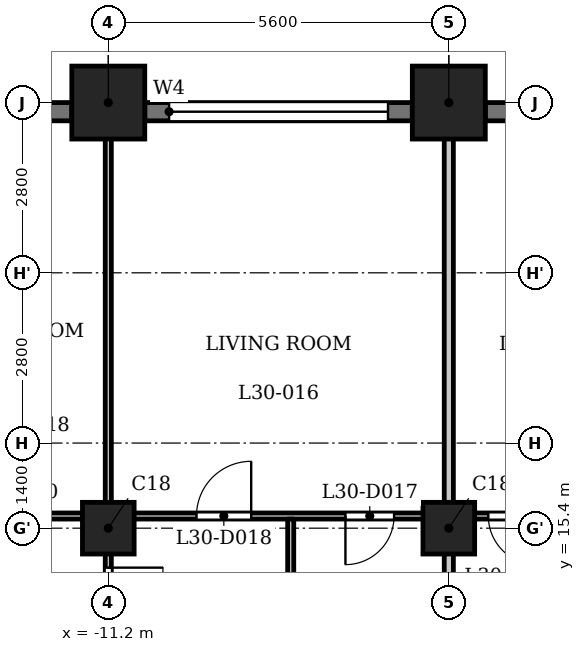
"""IFC4 building model, lengths in metres.
Left out: names, types, materials, properties, quantities, classifications, styles, units other than length and angle.
Written with IfcOpenShell. Run it as: python <this file> out.ifc"""

import sys

from ifc_helpers import new_model, si_unit, direction, frame, frame_2d, origin, origin_2d, place, context, subcontext, project, spatial, rectangle, extrude, element, fill, save


model = new_model("IFC4")
c1 = context("Model", 3, precision=1e-05, world=origin(), true_north=direction((0.0, 1.0)))
c2 = subcontext(c1, "Body", "Model", "MODEL_VIEW")
j1 = project(units=[si_unit("LENGTHUNIT", "METRE"), si_unit("PLANEANGLEUNIT", "RADIAN")], contexts=[c1])
p1 = place(None, origin())
s1 = spatial("IfcSite", under=j1, at=p1, CompositionType="ELEMENT")
p2 = place(p1, origin())
s2 = spatial("IfcBuilding", under=s1, at=p2, CompositionType="ELEMENT")
p3 = place(p2, frame((0.0, 0.0, 118.3)))
s3 = spatial("IfcBuildingStorey", under=s2, at=p3, CompositionType="ELEMENT", Elevation=118.3)
for number, where, z_axis, x_axis in (
    (1, (-5.6, 22.4, 0.0), (0.0, 0.0, 1.0), (1.0, 0.0, 0.0)),
    (2, (-11.2, 22.4, 0.0), (0.0, 0.0, 1.0), (1.0, 0.0, 0.0)),
):
    element("IfcColumn", number, at=place(p3, frame(where, z_axis=z_axis, x_axis=x_axis)), inside=s3, PredefinedType="COLUMN", context=c2, shape_type="SweptSolid", body=[
        extrude(rectangle(XDim=1.2, YDim=1.2, at=origin_2d()), origin(), (0.0, 0.0, 1.0), 3.5),
    ])
for number, where, z_axis, x_axis in (
    (3, (-11.2, 15.4, 0.0), (0.0, 0.0, 1.0), (1.0, 0.0, 0.0)),
    (4, (-5.6, 15.4, 0.0), (0.0, 0.0, 1.0), (1.0, 0.0, 0.0)),
):
    element("IfcColumn", number, at=place(p3, frame(where, z_axis=z_axis, x_axis=x_axis)), inside=s3, PredefinedType="COLUMN", context=c2, shape_type="SweptSolid", body=[
        extrude(rectangle(XDim=0.85, YDim=0.85, at=origin_2d()), origin(), (0.0, 0.0, 1.0), 3.5),
    ])
p4 = place(p3, frame((-0.6, 22.25, 0.0), z_axis=(0.0, 0.0, 1.0), x_axis=(-1.0, 0.0, 0.0)))
e5 = element("IfcWall", 5, at=p4, inside=s3, PredefinedType="SOLIDWALL", context=c2, shape_type="SweptSolid", body=[
    extrude(rectangle(XDim=4.4, YDim=0.3, at=frame_2d((2.2, 0.0))), origin(), (0.0, 0.0, 1.0), 2.4),
])
p5 = place(p4, frame((0.4, 0.0, 1.2)))
e6 = element("IfcOpeningElement", 6, at=p5, cuts=e5, PredefinedType="OPENING", context=c2, shape_type="SweptSolid", body=[
    extrude(rectangle(XDim=3.6, YDim=0.95, at=frame_2d((1.8, 0.475))), frame((0.0, 0.16, 0.0), z_axis=(0.0, -1.0, 0.0), x_axis=(1.0, 0.0, 0.0)), (0.0, 0.0, 1.0), 0.32),
])
p6 = place(p3, frame((-6.2, 22.25, 0.0), z_axis=(0.0, 0.0, 1.0), x_axis=(-1.0, 0.0, 0.0)))
e7 = element("IfcWall", 7, at=p6, inside=s3, PredefinedType="SOLIDWALL", context=c2, shape_type="SweptSolid", body=[
    extrude(rectangle(XDim=4.4, YDim=0.3, at=frame_2d((2.2, 0.0))), origin(), (0.0, 0.0, 1.0), 2.4),
])
p7 = place(p6, frame((0.4, 0.0, 1.2)))
e8 = element("IfcOpeningElement", 8, at=p7, cuts=e7, PredefinedType="OPENING", context=c2, shape_type="SweptSolid", body=[
    extrude(rectangle(XDim=3.6, YDim=0.95, at=frame_2d((1.8, 0.475))), frame((0.0, 0.16, 0.0), z_axis=(0.0, -1.0, 0.0), x_axis=(1.0, 0.0, 0.0)), (0.0, 0.0, 1.0), 0.32),
])
p8 = place(p3, frame((-11.8, 22.25, 0.0), z_axis=(0.0, 0.0, 1.0), x_axis=(-1.0, 0.0, 0.0)))
e9 = element("IfcWall", 9, at=p8, inside=s3, PredefinedType="SOLIDWALL", context=c2, shape_type="SweptSolid", body=[
    extrude(rectangle(XDim=4.4, YDim=0.3, at=frame_2d((2.2, 0.0))), origin(), (0.0, 0.0, 1.0), 2.4),
])
p9 = place(p8, frame((0.363, 0.0, 0.6)))
e10 = element("IfcOpeningElement", 10, at=p9, cuts=e9, PredefinedType="OPENING", context=c2, shape_type="SweptSolid", body=[
    extrude(rectangle(XDim=1.2, YDim=1.55, at=frame_2d((0.6, 0.775))), frame((0.0, 0.16, 0.0), z_axis=(0.0, -1.0, 0.0), x_axis=(1.0, 0.0, 0.0)), (0.0, 0.0, 1.0), 0.32),
])
p10 = place(p8, frame((2.337, 0.0, 0.9)))
e11 = element("IfcOpeningElement", 11, at=p10, cuts=e9, PredefinedType="OPENING", context=c2, shape_type="SweptSolid", body=[
    extrude(rectangle(XDim=1.8, YDim=1.25, at=frame_2d((0.9, 0.625))), frame((0.0, 0.16, 0.0), z_axis=(0.0, -1.0, 0.0), x_axis=(1.0, 0.0, 0.0)), (0.0, 0.0, 1.0), 0.32),
])
p11 = place(p3, frame((-16.725, 15.6, 0.0), z_axis=(0.0, 0.0, 1.0), x_axis=(1.0, 0.0, 0.0)))
e12 = element("IfcWall", 12, at=p11, inside=s3, PredefinedType="PARTITIONING", context=c2, shape_type="SweptSolid", body=[
    extrude(rectangle(XDim=33.45, YDim=0.1, at=frame_2d((16.725, 0.0))), origin(), (0.0, 0.0, 1.0), 3.2),
])
p12 = place(p11, frame((9.425, 0.0, 0.0)))
e13 = element("IfcOpeningElement", 13, at=p12, cuts=e12, PredefinedType="OPENING", context=c2, shape_type="SweptSolid", body=[
    extrude(rectangle(XDim=0.8, YDim=2.1, at=frame_2d((0.4, 1.05))), frame((0.0, 0.06, 0.0), z_axis=(0.0, -1.0, 0.0), x_axis=(1.0, 0.0, 0.0)), (0.0, 0.0, 1.0), 0.12),
])
p13 = place(p11, frame((6.975, 0.0, 0.0)))
e14 = element("IfcOpeningElement", 14, at=p13, cuts=e12, PredefinedType="OPENING", context=c2, shape_type="SweptSolid", body=[
    extrude(rectangle(XDim=0.9, YDim=2.1, at=frame_2d((0.45, 1.05))), frame((0.0, 0.06, 0.0), z_axis=(0.0, -1.0, 0.0), x_axis=(1.0, 0.0, 0.0)), (0.0, 0.0, 1.0), 0.12),
])
p14 = place(p11, frame((1.875, 0.0, 0.0)))
e15 = element("IfcOpeningElement", 15, at=p14, cuts=e12, PredefinedType="OPENING", context=c2, shape_type="SweptSolid", body=[
    extrude(rectangle(XDim=0.9, YDim=2.1, at=frame_2d((0.45, 1.05))), frame((0.0, 0.06, 0.0), z_axis=(0.0, -1.0, 0.0), x_axis=(1.0, 0.0, 0.0)), (0.0, 0.0, 1.0), 0.12),
])
p15 = place(p11, frame((3.475, 0.0, 0.0)))
e16 = element("IfcOpeningElement", 16, at=p15, cuts=e12, PredefinedType="OPENING", context=c2, shape_type="SweptSolid", body=[
    extrude(rectangle(XDim=0.9, YDim=2.1, at=frame_2d((0.45, 1.05))), frame((0.0, 0.06, 0.0), z_axis=(0.0, -1.0, 0.0), x_axis=(1.0, 0.0, 0.0)), (0.0, 0.0, 1.0), 0.12),
])
p16 = place(p11, frame((11.775, 0.0, 0.0)))
e17 = element("IfcOpeningElement", 17, at=p16, cuts=e12, PredefinedType="OPENING", context=c2, shape_type="SweptSolid", body=[
    extrude(rectangle(XDim=0.8, YDim=2.1, at=frame_2d((0.4, 1.05))), frame((0.0, 0.06, 0.0), z_axis=(0.0, -1.0, 0.0), x_axis=(1.0, 0.0, 0.0)), (0.0, 0.0, 1.0), 0.12),
])
p17 = place(p11, frame((14.175, 0.0, 0.0)))
e18 = element("IfcOpeningElement", 18, at=p17, cuts=e12, PredefinedType="OPENING", context=c2, shape_type="SweptSolid", body=[
    extrude(rectangle(XDim=0.9, YDim=2.1, at=frame_2d((0.45, 1.05))), frame((0.0, 0.06, 0.0), z_axis=(0.0, -1.0, 0.0), x_axis=(1.0, 0.0, 0.0)), (0.0, 0.0, 1.0), 0.12),
])
p18 = place(p11, frame((20.725, 0.0, 0.0)))
e19 = element("IfcOpeningElement", 19, at=p18, cuts=e12, PredefinedType="OPENING", context=c2, shape_type="SweptSolid", body=[
    extrude(rectangle(XDim=0.8, YDim=2.1, at=frame_2d((0.4, 1.05))), frame((0.0, 0.06, 0.0), z_axis=(0.0, -1.0, 0.0), x_axis=(1.0, 0.0, 0.0)), (0.0, 0.0, 1.0), 0.12),
])
p19 = place(p11, frame((18.375, 0.0, 0.0)))
e20 = element("IfcOpeningElement", 20, at=p19, cuts=e12, PredefinedType="OPENING", context=c2, shape_type="SweptSolid", body=[
    extrude(rectangle(XDim=0.9, YDim=2.1, at=frame_2d((0.45, 1.05))), frame((0.0, 0.06, 0.0), z_axis=(0.0, -1.0, 0.0), x_axis=(1.0, 0.0, 0.0)), (0.0, 0.0, 1.0), 0.12),
])
p20 = place(p11, frame((26.425, 0.0, 0.0)))
e21 = element("IfcOpeningElement", 21, at=p20, cuts=e12, PredefinedType="OPENING", context=c2, shape_type="SweptSolid", body=[
    extrude(rectangle(XDim=0.8, YDim=2.1, at=frame_2d((0.4, 1.05))), frame((0.0, 0.06, 0.0), z_axis=(0.0, -1.0, 0.0), x_axis=(1.0, 0.0, 0.0)), (0.0, 0.0, 1.0), 0.12),
])
p21 = place(p11, frame((23.875, 0.0, 0.0)))
e22 = element("IfcOpeningElement", 22, at=p21, cuts=e12, PredefinedType="OPENING", context=c2, shape_type="SweptSolid", body=[
    extrude(rectangle(XDim=0.9, YDim=2.1, at=frame_2d((0.45, 1.05))), frame((0.0, 0.06, 0.0), z_axis=(0.0, -1.0, 0.0), x_axis=(1.0, 0.0, 0.0)), (0.0, 0.0, 1.0), 0.12),
])
p22 = place(p11, frame((28.575, 0.0, 0.0)))
e23 = element("IfcOpeningElement", 23, at=p22, cuts=e12, PredefinedType="OPENING", context=c2, shape_type="SweptSolid", body=[
    extrude(rectangle(XDim=0.8, YDim=2.1, at=frame_2d((0.4, 1.05))), frame((0.0, 0.06, 0.0), z_axis=(0.0, -1.0, 0.0), x_axis=(1.0, 0.0, 0.0)), (0.0, 0.0, 1.0), 0.12),
])
p23 = place(p11, frame((30.725, 0.0, 0.0)))
e24 = element("IfcOpeningElement", 24, at=p23, cuts=e12, PredefinedType="OPENING", context=c2, shape_type="SweptSolid", body=[
    extrude(rectangle(XDim=0.9, YDim=2.1, at=frame_2d((0.45, 1.05))), frame((0.0, 0.06, 0.0), z_axis=(0.0, -1.0, 0.0), x_axis=(1.0, 0.0, 0.0)), (0.0, 0.0, 1.0), 0.12),
])
p24 = place(p3, frame((-11.2, 13.275, 0.0), z_axis=(0.0, 0.0, 1.0), x_axis=(0.0, 1.0, 0.0)))
e25 = element("IfcWall", 25, at=p24, inside=s3, PredefinedType="PARTITIONING", context=c2, shape_type="SweptSolid", body=[
    extrude(rectangle(XDim=2.275, YDim=0.1, at=frame_2d((1.138, 0.0))), origin(), (0.0, 0.0, 1.0), 3.2),
])
p25 = place(p24, frame((0.576, 0.0, 0.0)))
e26 = element("IfcOpeningElement", 26, at=p25, cuts=e25, PredefinedType="OPENING", context=c2, shape_type="SweptSolid", body=[
    extrude(rectangle(XDim=0.9, YDim=2.1, at=frame_2d((0.45, 1.05))), frame((0.0, 0.06, 0.0), z_axis=(0.0, -1.0, 0.0), x_axis=(1.0, 0.0, 0.0)), (0.0, 0.0, 1.0), 0.12),
])
p26 = place(p3, frame((-11.2, 15.65, 0.0), z_axis=(0.0, 0.0, 1.0), x_axis=(0.0, 1.0, 0.0)))
e27 = element("IfcWall", 27, at=p26, inside=s3, PredefinedType="PARTITIONING", context=c2, shape_type="SweptSolid", body=[
    extrude(rectangle(XDim=7.33, YDim=0.1, at=frame_2d((3.665, 0.0))), origin(), (0.0, 0.0, 1.0), 3.2),
])
p27 = place(p3, frame((-8.2, 13.275, 0.0), z_axis=(0.0, 0.0, 1.0), x_axis=(0.0, 1.0, 0.0)))
e28 = element("IfcWall", 28, at=p27, inside=s3, PredefinedType="PARTITIONING", context=c2, shape_type="SweptSolid", body=[
    extrude(rectangle(XDim=2.275, YDim=0.1, at=frame_2d((1.138, 0.0))), origin(), (0.0, 0.0, 1.0), 3.2),
])
p28 = place(p3, frame((-5.6, 13.275, 0.0), z_axis=(0.0, 0.0, 1.0), x_axis=(0.0, 1.0, 0.0)))
e29 = element("IfcWall", 29, at=p28, inside=s3, PredefinedType="PARTITIONING", context=c2, shape_type="SweptSolid", body=[
    extrude(rectangle(XDim=2.275, YDim=0.15, at=frame_2d((1.138, 0.0))), origin(), (0.0, 0.0, 1.0), 3.2),
])
p29 = place(p3, frame((-5.6, 15.65, 0.0), z_axis=(0.0, 0.0, 1.0), x_axis=(0.0, 1.0, 0.0)))
e30 = element("IfcWall", 30, at=p29, inside=s3, PredefinedType="PARTITIONING", context=c2, shape_type="SweptSolid", body=[
    extrude(rectangle(XDim=7.33, YDim=0.15, at=frame_2d((3.665, 0.0))), origin(), (0.0, 0.0, 1.0), 3.2),
])
p30 = place(p25, origin())
e31 = element("IfcDoor", 31, at=p30, inside=s3, OperationType="SINGLE_SWING_RIGHT", PredefinedType="DOOR", context=c2, shape_type="SweptSolid", body=[
    extrude(rectangle(XDim=0.9, YDim=2.1, at=frame_2d((0.45, 1.05))), frame((0.0, 0.025, 0.0), z_axis=(0.0, -1.0, 0.0), x_axis=(1.0, 0.0, 0.0)), (0.0, 0.0, 1.0), 0.05),
])
fill(e26, e31)
p31 = place(p12, origin())
e32 = element("IfcDoor", 32, at=p31, inside=s3, OperationType="SINGLE_SWING_LEFT", PredefinedType="DOOR", context=c2, shape_type="SweptSolid", body=[
    extrude(rectangle(XDim=0.8, YDim=2.1, at=frame_2d((0.4, 1.05))), frame((0.0, 0.025, 0.0), z_axis=(0.0, -1.0, 0.0), x_axis=(1.0, 0.0, 0.0)), (0.0, 0.0, 1.0), 0.05),
])
fill(e13, e32)
p32 = place(p13, origin())
e33 = element("IfcDoor", 33, at=p32, inside=s3, OperationType="SINGLE_SWING_LEFT", PredefinedType="DOOR", context=c2, shape_type="SweptSolid", body=[
    extrude(rectangle(XDim=0.9, YDim=2.1, at=frame_2d((0.45, 1.05))), frame((0.0, 0.025, 0.0), z_axis=(0.0, -1.0, 0.0), x_axis=(1.0, 0.0, 0.0)), (0.0, 0.0, 1.0), 0.05),
])
fill(e14, e33)
p33 = place(p16, origin())
e34 = element("IfcDoor", 34, at=p33, inside=s3, OperationType="SINGLE_SWING_RIGHT", PredefinedType="DOOR", context=c2, shape_type="SweptSolid", body=[
    extrude(rectangle(XDim=0.8, YDim=2.1, at=frame_2d((0.4, 1.05))), frame((0.0, 0.025, 0.0), z_axis=(0.0, -1.0, 0.0), x_axis=(1.0, 0.0, 0.0)), (0.0, 0.0, 1.0), 0.05),
])
fill(e17, e34)
p34 = place(p7, origin())
e35 = element("IfcWindow", 35, at=p34, inside=s3, PartitioningType="SINGLE_PANEL", PredefinedType="WINDOW", context=c2, shape_type="SweptSolid", body=[
    extrude(rectangle(XDim=3.6, YDim=0.95, at=frame_2d((1.8, 0.475))), frame((0.0, 0.03, 0.0), z_axis=(0.0, -1.0, 0.0), x_axis=(1.0, 0.0, 0.0)), (0.0, 0.0, 1.0), 0.06),
])
fill(e8, e35)
save(model, sys.argv[1])
